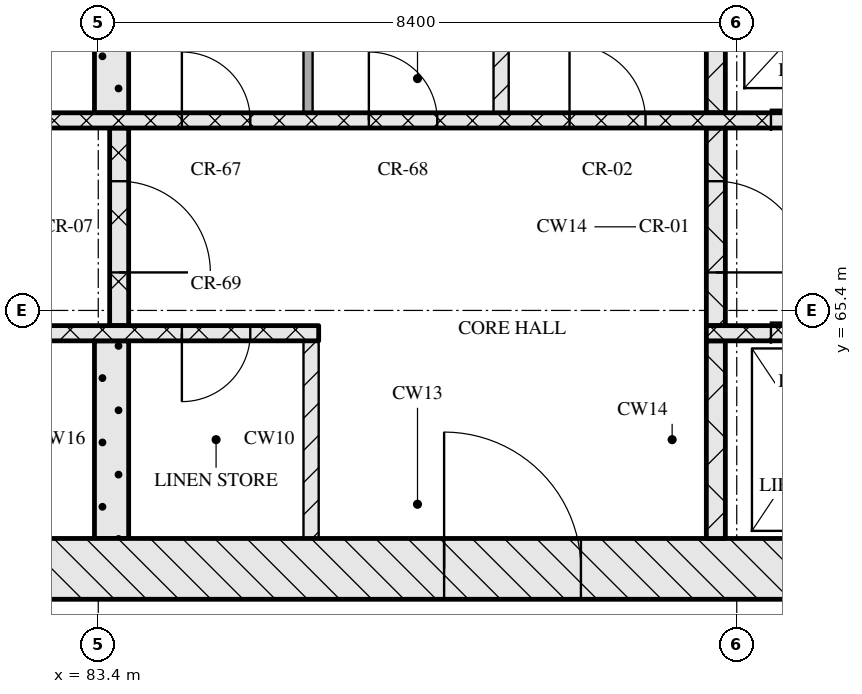
"""IFC4 building model, lengths in metres.
Left out: names, types, materials, properties, quantities, classifications, styles, units other than length and angle.
Written with IfcOpenShell. Run it as: python <this file> out.ifc"""

import sys

from ifc_helpers import new_model, si_unit, direction, frame, frame_2d, origin, place, context, subcontext, project, spatial, rectangle, extrude, element, fill, save


model = new_model("IFC4")
c1 = context("Model", 3, precision=1e-05, world=origin(), true_north=direction((0.0, 1.0)))
c2 = subcontext(c1, "Body", "Model", "MODEL_VIEW")
j1 = project(units=[si_unit("LENGTHUNIT", "METRE"), si_unit("PLANEANGLEUNIT", "RADIAN")], contexts=[c1])
p1 = place(None, origin())
s1 = spatial("IfcSite", under=j1, at=p1, CompositionType="ELEMENT")
p2 = place(p1, origin())
s2 = spatial("IfcBuilding", under=s1, at=p2, CompositionType="ELEMENT")
p3 = place(p2, frame((0.0, 0.0, 187.05)))
s3 = spatial("IfcBuildingStorey", under=s2, at=p3, CompositionType="ELEMENT", Elevation=187.05)
p4 = place(p3, frame((67.0, 62.0, 0.0), z_axis=(0.0, 0.0, 1.0), x_axis=(1.0, 0.0, 0.0)))
e1 = element("IfcWall", 1, at=p4, inside=s3, PredefinedType="SOLIDWALL", context=c2, shape_type="SweptSolid", body=[
    extrude(rectangle(XDim=41.2, YDim=0.8, at=frame_2d((20.6, 0.0))), origin(), (0.0, 0.0, 1.0), 3.32),
])
p5 = place(p4, frame((20.95, 0.0, 0.0)))
e2 = element("IfcOpeningElement", 2, at=p5, cuts=e1, PredefinedType="OPENING", context=c2, shape_type="SweptSolid", body=[
    extrude(rectangle(XDim=1.8, YDim=2.1, at=frame_2d((0.9, 1.05))), frame((0.0, 0.41, 0.0), z_axis=(0.0, -1.0, 0.0), x_axis=(1.0, 0.0, 0.0)), (0.0, 0.0, 1.0), 0.82),
])
p6 = place(p3, frame((83.575, 62.4, 0.0), z_axis=(0.0, 0.0, 1.0), x_axis=(0.0, 1.0, 0.0)))
e3 = element("IfcWall", 3, at=p6, inside=s3, PredefinedType="SOLIDWALL", context=c2, shape_type="SweptSolid", body=[
    extrude(rectangle(XDim=2.6, YDim=0.45, at=frame_2d((1.3, 0.0))), origin(), (0.0, 0.0, 1.0), 3.32),
])
p7 = place(p3, frame((86.2, 62.4, 0.0), z_axis=(0.0, 0.0, 1.0), x_axis=(0.0, 1.0, 0.0)))
e4 = element("IfcWall", 4, at=p7, inside=s3, PredefinedType="PARTITIONING", context=c2, shape_type="SweptSolid", body=[
    extrude(rectangle(XDim=2.6, YDim=0.2, at=frame_2d((1.3, 0.0))), origin(), (0.0, 0.0, 1.0), 3.32),
])
p8 = place(p3, frame((91.525, 62.4, 0.0), z_axis=(0.0, 0.0, 1.0), x_axis=(0.0, 1.0, 0.0)))
e5 = element("IfcWall", 5, at=p8, inside=s3, PredefinedType="SOLIDWALL", context=c2, shape_type="SweptSolid", body=[
    extrude(rectangle(XDim=2.6, YDim=0.25, at=frame_2d((1.3, 0.0))), origin(), (0.0, 0.0, 1.0), 3.32),
])
p9 = place(p3, frame((67.8, 65.1, 0.0), z_axis=(0.0, 0.0, 1.0), x_axis=(1.0, 0.0, 0.0)))
e6 = element("IfcWall", 6, at=p9, inside=s3, PredefinedType="SOLIDWALL", context=c2, shape_type="SweptSolid", body=[
    extrude(rectangle(XDim=18.5, YDim=0.2, at=frame_2d((9.25, 0.0))), origin(), (0.0, 0.0, 1.0), 3.32),
])
p10 = place(p9, frame((7.27, 0.0, 0.0)))
e7 = element("IfcOpeningElement", 7, at=p10, cuts=e6, PredefinedType="OPENING", context=c2, shape_type="SweptSolid", body=[
    extrude(rectangle(XDim=0.9, YDim=2.1, at=frame_2d((0.45, 1.05))), frame((0.0, 0.11, 0.0), z_axis=(0.0, -1.0, 0.0), x_axis=(1.0, 0.0, 0.0)), (0.0, 0.0, 1.0), 0.22),
])
p11 = place(p9, frame((9.65, 0.0, 0.0)))
e8 = element("IfcOpeningElement", 8, at=p11, cuts=e6, PredefinedType="OPENING", context=c2, shape_type="SweptSolid", body=[
    extrude(rectangle(XDim=0.9, YDim=2.1, at=frame_2d((0.45, 1.05))), frame((0.0, 0.11, 0.0), z_axis=(0.0, -1.0, 0.0), x_axis=(1.0, 0.0, 0.0)), (0.0, 0.0, 1.0), 0.22),
])
p12 = place(p9, frame((13.36, 0.0, 0.0)))
e9 = element("IfcOpeningElement", 9, at=p12, cuts=e6, PredefinedType="OPENING", context=c2, shape_type="SweptSolid", body=[
    extrude(rectangle(XDim=0.9, YDim=2.1, at=frame_2d((0.45, 1.05))), frame((0.0, 0.11, 0.0), z_axis=(0.0, -1.0, 0.0), x_axis=(1.0, 0.0, 0.0)), (0.0, 0.0, 1.0), 0.22),
])
p13 = place(p9, frame((16.7, 0.0, 0.0)))
e10 = element("IfcOpeningElement", 10, at=p13, cuts=e6, PredefinedType="OPENING", context=c2, shape_type="SweptSolid", body=[
    extrude(rectangle(XDim=0.9, YDim=2.1, at=frame_2d((0.45, 1.05))), frame((0.0, 0.11, 0.0), z_axis=(0.0, -1.0, 0.0), x_axis=(1.0, 0.0, 0.0)), (0.0, 0.0, 1.0), 0.22),
])
p14 = place(p3, frame((91.4, 65.1, 0.0), z_axis=(0.0, 0.0, 1.0), x_axis=(1.0, 0.0, 0.0)))
e11 = element("IfcWall", 11, at=p14, inside=s3, PredefinedType="SOLIDWALL", context=c2, shape_type="SweptSolid", body=[
    extrude(rectangle(XDim=16.0, YDim=0.2, at=frame_2d((8.0, 0.0))), origin(), (0.0, 0.0, 1.0), 3.32),
])
p15 = place(p14, frame((0.85, 0.0, 0.0)))
e12 = element("IfcOpeningElement", 12, at=p15, cuts=e11, PredefinedType="OPENING", context=c2, shape_type="SweptSolid", body=[
    extrude(rectangle(XDim=1.1, YDim=2.1, at=frame_2d((0.55, 1.05))), frame((0.0, 0.11, 0.0), z_axis=(0.0, -1.0, 0.0), x_axis=(1.0, 0.0, 0.0)), (0.0, 0.0, 1.0), 0.22),
])
p16 = place(p14, frame((3.35, 0.0, 0.0)))
e13 = element("IfcOpeningElement", 13, at=p16, cuts=e11, PredefinedType="OPENING", context=c2, shape_type="SweptSolid", body=[
    extrude(rectangle(XDim=1.1, YDim=2.1, at=frame_2d((0.55, 1.05))), frame((0.0, 0.11, 0.0), z_axis=(0.0, -1.0, 0.0), x_axis=(1.0, 0.0, 0.0)), (0.0, 0.0, 1.0), 0.22),
])
p17 = place(p14, frame((5.85, 0.0, 0.0)))
e14 = element("IfcOpeningElement", 14, at=p17, cuts=e11, PredefinedType="OPENING", context=c2, shape_type="SweptSolid", body=[
    extrude(rectangle(XDim=1.1, YDim=2.1, at=frame_2d((0.55, 1.05))), frame((0.0, 0.11, 0.0), z_axis=(0.0, -1.0, 0.0), x_axis=(1.0, 0.0, 0.0)), (0.0, 0.0, 1.0), 0.22),
])
p18 = place(p14, frame((7.83, 0.0, 0.0)))
e15 = element("IfcOpeningElement", 15, at=p18, cuts=e11, PredefinedType="OPENING", context=c2, shape_type="SweptSolid", body=[
    extrude(rectangle(XDim=0.9, YDim=2.1, at=frame_2d((0.45, 1.05))), frame((0.0, 0.11, 0.0), z_axis=(0.0, -1.0, 0.0), x_axis=(1.0, 0.0, 0.0)), (0.0, 0.0, 1.0), 0.22),
])
p19 = place(p3, frame((83.675, 65.2, 0.0), z_axis=(0.0, 0.0, 1.0), x_axis=(0.0, 1.0, 0.0)))
e16 = element("IfcWall", 16, at=p19, inside=s3, PredefinedType="SOLIDWALL", context=c2, shape_type="SweptSolid", body=[
    extrude(rectangle(XDim=2.6, YDim=0.25, at=frame_2d((1.3, 0.0))), origin(), (0.0, 0.0, 1.0), 3.32),
])
p20 = place(p19, frame((0.7, 0.0, 0.0)))
e17 = element("IfcOpeningElement", 17, at=p20, cuts=e16, PredefinedType="OPENING", context=c2, shape_type="SweptSolid", body=[
    extrude(rectangle(XDim=1.2, YDim=2.1, at=frame_2d((0.6, 1.05))), frame((0.0, 0.135, 0.0), z_axis=(0.0, -1.0, 0.0), x_axis=(1.0, 0.0, 0.0)), (0.0, 0.0, 1.0), 0.27),
])
p21 = place(p3, frame((91.525, 65.2, 0.0), z_axis=(0.0, 0.0, 1.0), x_axis=(0.0, 1.0, 0.0)))
e18 = element("IfcWall", 18, at=p21, inside=s3, PredefinedType="SOLIDWALL", context=c2, shape_type="SweptSolid", body=[
    extrude(rectangle(XDim=2.6, YDim=0.25, at=frame_2d((1.3, 0.0))), origin(), (0.0, 0.0, 1.0), 3.32),
])
p22 = place(p21, frame((0.7, 0.0, 0.0)))
e19 = element("IfcOpeningElement", 19, at=p22, cuts=e18, PredefinedType="OPENING", context=c2, shape_type="SweptSolid", body=[
    extrude(rectangle(XDim=1.2, YDim=2.1, at=frame_2d((0.6, 1.05))), frame((0.0, 0.135, 0.0), z_axis=(0.0, -1.0, 0.0), x_axis=(1.0, 0.0, 0.0)), (0.0, 0.0, 1.0), 0.27),
])
p23 = place(p3, frame((76.05, 67.9, 0.0), z_axis=(0.0, 0.0, 1.0), x_axis=(1.0, 0.0, 0.0)))
e20 = element("IfcWall", 20, at=p23, inside=s3, PredefinedType="SOLIDWALL", context=c2, shape_type="SweptSolid", body=[
    extrude(rectangle(XDim=23.1, YDim=0.2, at=frame_2d((11.55, 0.0))), origin(), (0.0, 0.0, 1.0), 3.32),
])
p24 = place(p23, frame((0.75, 0.0, 0.0)))
e21 = element("IfcOpeningElement", 21, at=p24, cuts=e20, PredefinedType="OPENING", context=c2, shape_type="SweptSolid", body=[
    extrude(rectangle(XDim=0.9, YDim=2.1, at=frame_2d((0.45, 1.05))), frame((0.0, 0.11, 0.0), z_axis=(0.0, -1.0, 0.0), x_axis=(1.0, 0.0, 0.0)), (0.0, 0.0, 1.0), 0.22),
])
p25 = place(p23, frame((3.32, 0.0, 0.0)))
e22 = element("IfcOpeningElement", 22, at=p25, cuts=e20, PredefinedType="OPENING", context=c2, shape_type="SweptSolid", body=[
    extrude(rectangle(XDim=0.9, YDim=2.1, at=frame_2d((0.45, 1.05))), frame((0.0, 0.11, 0.0), z_axis=(0.0, -1.0, 0.0), x_axis=(1.0, 0.0, 0.0)), (0.0, 0.0, 1.0), 0.22),
])
p26 = place(p23, frame((5.77, 0.0, 0.0)))
e23 = element("IfcOpeningElement", 23, at=p26, cuts=e20, PredefinedType="OPENING", context=c2, shape_type="SweptSolid", body=[
    extrude(rectangle(XDim=0.9, YDim=2.1, at=frame_2d((0.45, 1.05))), frame((0.0, 0.11, 0.0), z_axis=(0.0, -1.0, 0.0), x_axis=(1.0, 0.0, 0.0)), (0.0, 0.0, 1.0), 0.22),
])
p27 = place(p23, frame((8.45, 0.0, 0.0)))
e24 = element("IfcOpeningElement", 24, at=p27, cuts=e20, PredefinedType="OPENING", context=c2, shape_type="SweptSolid", body=[
    extrude(rectangle(XDim=0.9, YDim=2.1, at=frame_2d((0.45, 1.05))), frame((0.0, 0.11, 0.0), z_axis=(0.0, -1.0, 0.0), x_axis=(1.0, 0.0, 0.0)), (0.0, 0.0, 1.0), 0.22),
])
p28 = place(p23, frame((10.91, 0.0, 0.0)))
e25 = element("IfcOpeningElement", 25, at=p28, cuts=e20, PredefinedType="OPENING", context=c2, shape_type="SweptSolid", body=[
    extrude(rectangle(XDim=0.9, YDim=2.1, at=frame_2d((0.45, 1.05))), frame((0.0, 0.11, 0.0), z_axis=(0.0, -1.0, 0.0), x_axis=(1.0, 0.0, 0.0)), (0.0, 0.0, 1.0), 0.22),
])
p29 = place(p23, frame((13.55, 0.0, 0.0)))
e26 = element("IfcOpeningElement", 26, at=p29, cuts=e20, PredefinedType="OPENING", context=c2, shape_type="SweptSolid", body=[
    extrude(rectangle(XDim=1.0, YDim=2.1, at=frame_2d((0.5, 1.05))), frame((0.0, 0.11, 0.0), z_axis=(0.0, -1.0, 0.0), x_axis=(1.0, 0.0, 0.0)), (0.0, 0.0, 1.0), 0.22),
])
p30 = place(p23, frame((16.2, 0.0, 0.0)))
e27 = element("IfcOpeningElement", 27, at=p30, cuts=e20, PredefinedType="OPENING", context=c2, shape_type="SweptSolid", body=[
    extrude(rectangle(XDim=1.1, YDim=2.1, at=frame_2d((0.55, 1.05))), frame((0.0, 0.11, 0.0), z_axis=(0.0, -1.0, 0.0), x_axis=(1.0, 0.0, 0.0)), (0.0, 0.0, 1.0), 0.22),
])
p31 = place(p23, frame((18.7, 0.0, 0.0)))
e28 = element("IfcOpeningElement", 28, at=p31, cuts=e20, PredefinedType="OPENING", context=c2, shape_type="SweptSolid", body=[
    extrude(rectangle(XDim=1.1, YDim=2.1, at=frame_2d((0.55, 1.05))), frame((0.0, 0.11, 0.0), z_axis=(0.0, -1.0, 0.0), x_axis=(1.0, 0.0, 0.0)), (0.0, 0.0, 1.0), 0.22),
])
p32 = place(p23, frame((21.2, 0.0, 0.0)))
e29 = element("IfcOpeningElement", 29, at=p32, cuts=e20, PredefinedType="OPENING", context=c2, shape_type="SweptSolid", body=[
    extrude(rectangle(XDim=1.1, YDim=2.1, at=frame_2d((0.55, 1.05))), frame((0.0, 0.11, 0.0), z_axis=(0.0, -1.0, 0.0), x_axis=(1.0, 0.0, 0.0)), (0.0, 0.0, 1.0), 0.22),
])
p33 = place(p3, frame((83.575, 68.0, 0.0), z_axis=(0.0, 0.0, 1.0), x_axis=(0.0, 1.0, 0.0)))
e30 = element("IfcWall", 30, at=p33, inside=s3, PredefinedType="SOLIDWALL", context=c2, shape_type="SweptSolid", body=[
    extrude(rectangle(XDim=2.6, YDim=0.45, at=frame_2d((1.3, 0.0))), origin(), (0.0, 0.0, 1.0), 3.32),
])
p34 = place(p3, frame((86.16, 68.0, 0.0), z_axis=(0.0, 0.0, 1.0), x_axis=(0.0, 1.0, 0.0)))
e31 = element("IfcWall", 31, at=p34, inside=s3, PredefinedType="PARTITIONING", context=c2, shape_type="SweptSolid", body=[
    extrude(rectangle(XDim=2.6, YDim=0.12, at=frame_2d((1.3, 0.0))), origin(), (0.0, 0.0, 1.0), 3.32),
])
p35 = place(p3, frame((88.7, 68.0, 0.0), z_axis=(0.0, 0.0, 1.0), x_axis=(0.0, 1.0, 0.0)))
e32 = element("IfcWall", 32, at=p35, inside=s3, PredefinedType="PARTITIONING", context=c2, shape_type="SweptSolid", body=[
    extrude(rectangle(XDim=2.6, YDim=0.2, at=frame_2d((1.3, 0.0))), origin(), (0.0, 0.0, 1.0), 3.32),
])
p36 = place(p3, frame((91.525, 68.0, 0.0), z_axis=(0.0, 0.0, 1.0), x_axis=(0.0, 1.0, 0.0)))
e33 = element("IfcWall", 33, at=p36, inside=s3, PredefinedType="SOLIDWALL", context=c2, shape_type="SweptSolid", body=[
    extrude(rectangle(XDim=2.6, YDim=0.25, at=frame_2d((1.3, 0.0))), origin(), (0.0, 0.0, 1.0), 3.32),
])
p37 = place(p5, origin())
e34 = element("IfcDoor", 34, at=p37, inside=s3, OperationType="DOUBLE_DOOR_SINGLE_SWING", PredefinedType="DOOR", context=c2, shape_type="SweptSolid", body=[
    extrude(rectangle(XDim=1.8, YDim=2.1, at=frame_2d((0.9, 1.05))), frame((0.0, 0.025, 0.0), z_axis=(0.0, -1.0, 0.0), x_axis=(1.0, 0.0, 0.0)), (0.0, 0.0, 1.0), 0.05),
])
fill(e2, e34)
p38 = place(p13, origin())
e35 = element("IfcDoor", 35, at=p38, inside=s3, OperationType="SINGLE_SWING_RIGHT", PredefinedType="DOOR", context=c2, shape_type="SweptSolid", body=[
    extrude(rectangle(XDim=0.9, YDim=2.1, at=frame_2d((0.45, 1.05))), frame((0.0, 0.025, 0.0), z_axis=(0.0, -1.0, 0.0), x_axis=(1.0, 0.0, 0.0)), (0.0, 0.0, 1.0), 0.05),
])
fill(e10, e35)
p39 = place(p15, origin())
e36 = element("IfcDoor", 36, at=p39, inside=s3, OperationType="SLIDING_TO_LEFT", PredefinedType="DOOR", context=c2, shape_type="SweptSolid", body=[
    extrude(rectangle(XDim=1.1, YDim=2.1, at=frame_2d((0.55, 1.05))), frame((0.0, 0.025, 0.0), z_axis=(0.0, -1.0, 0.0), x_axis=(1.0, 0.0, 0.0)), (0.0, 0.0, 1.0), 0.05),
])
fill(e12, e36)
p40 = place(p20, origin())
e37 = element("IfcDoor", 37, at=p40, inside=s3, OperationType="SINGLE_SWING_RIGHT", PredefinedType="DOOR", context=c2, shape_type="SweptSolid", body=[
    extrude(rectangle(XDim=1.2, YDim=2.1, at=frame_2d((0.6, 1.05))), frame((0.0, 0.025, 0.0), z_axis=(0.0, -1.0, 0.0), x_axis=(1.0, 0.0, 0.0)), (0.0, 0.0, 1.0), 0.05),
])
fill(e17, e37)
p41 = place(p22, origin())
e38 = element("IfcDoor", 38, at=p41, inside=s3, OperationType="SINGLE_SWING_RIGHT", PredefinedType="DOOR", context=c2, shape_type="SweptSolid", body=[
    extrude(rectangle(XDim=1.2, YDim=2.1, at=frame_2d((0.6, 1.05))), frame((0.0, 0.025, 0.0), z_axis=(0.0, -1.0, 0.0), x_axis=(1.0, 0.0, 0.0)), (0.0, 0.0, 1.0), 0.05),
])
fill(e19, e38)
p42 = place(p27, origin())
e39 = element("IfcDoor", 39, at=p42, inside=s3, OperationType="SINGLE_SWING_LEFT", PredefinedType="DOOR", context=c2, shape_type="SweptSolid", body=[
    extrude(rectangle(XDim=0.9, YDim=2.1, at=frame_2d((0.45, 1.05))), frame((0.0, 0.025, 0.0), z_axis=(0.0, -1.0, 0.0), x_axis=(1.0, 0.0, 0.0)), (0.0, 0.0, 1.0), 0.05),
])
fill(e24, e39)
p43 = place(p28, origin())
e40 = element("IfcDoor", 40, at=p43, inside=s3, OperationType="SINGLE_SWING_LEFT", PredefinedType="DOOR", context=c2, shape_type="SweptSolid", body=[
    extrude(rectangle(XDim=0.9, YDim=2.1, at=frame_2d((0.45, 1.05))), frame((0.0, 0.025, 0.0), z_axis=(0.0, -1.0, 0.0), x_axis=(1.0, 0.0, 0.0)), (0.0, 0.0, 1.0), 0.05),
])
fill(e25, e40)
p44 = place(p29, origin())
e41 = element("IfcDoor", 41, at=p44, inside=s3, OperationType="SINGLE_SWING_LEFT", PredefinedType="DOOR", context=c2, shape_type="SweptSolid", body=[
    extrude(rectangle(XDim=1.0, YDim=2.1, at=frame_2d((0.5, 1.05))), frame((0.0, 0.025, 0.0), z_axis=(0.0, -1.0, 0.0), x_axis=(1.0, 0.0, 0.0)), (0.0, 0.0, 1.0), 0.05),
])
fill(e26, e41)
p45 = place(p30, origin())
e42 = element("IfcDoor", 42, at=p45, inside=s3, OperationType="SLIDING_TO_RIGHT", PredefinedType="DOOR", context=c2, shape_type="SweptSolid", body=[
    extrude(rectangle(XDim=1.1, YDim=2.1, at=frame_2d((0.55, 1.05))), frame((0.0, 0.025, 0.0), z_axis=(0.0, -1.0, 0.0), x_axis=(1.0, 0.0, 0.0)), (0.0, 0.0, 1.0), 0.05),
])
fill(e27, e42)
save(model, sys.argv[1])
